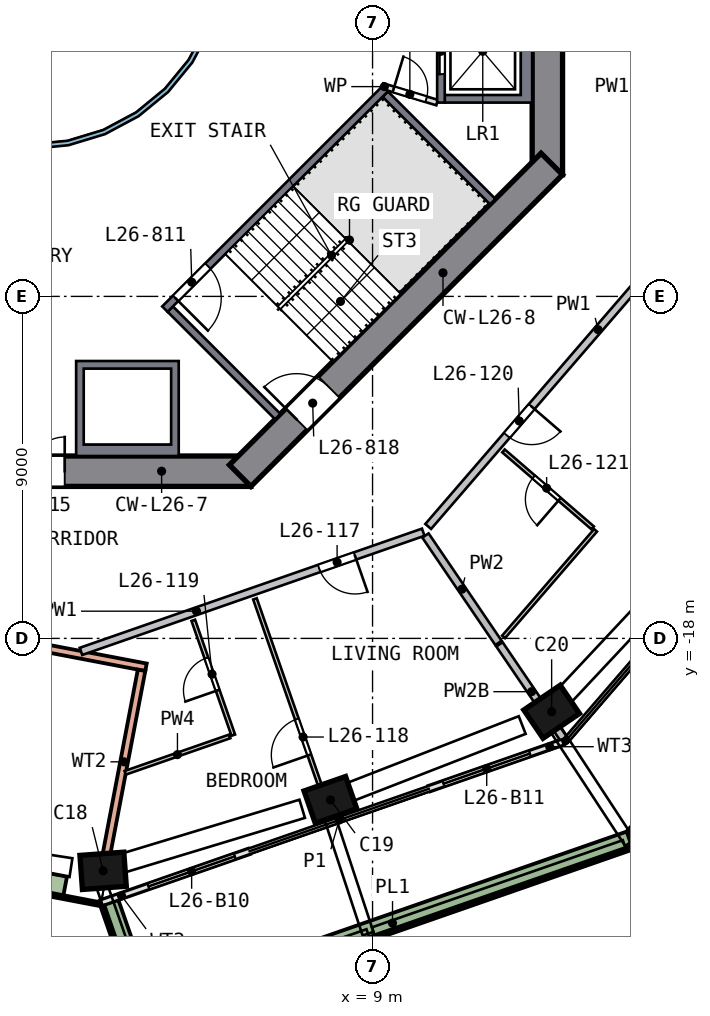
"""IFC4 building model, lengths in metres.
Left out: names, types, materials, properties, quantities, classifications, styles, units other than length and angle.
Written with IfcOpenShell. Run it as: python <this file> out.ifc"""

import sys

from ifc_helpers import new_model, si_unit, direction, frame, frame_2d, origin, origin_2d, place, context, subcontext, project, spatial, polyline, rectangle, outline, extrude, element, fill, save


model = new_model("IFC4")
c1 = context("Model", 3, precision=1e-05, world=origin(), true_north=direction((0.0, 1.0)))
c2 = subcontext(c1, "Body", "Model", "MODEL_VIEW")
j1 = project(units=[si_unit("LENGTHUNIT", "METRE"), si_unit("PLANEANGLEUNIT", "RADIAN")], contexts=[c1])
p1 = place(None, origin())
s1 = spatial("IfcSite", under=j1, at=p1, CompositionType="ELEMENT")
p2 = place(p1, origin())
s2 = spatial("IfcBuilding", under=s1, at=p2, CompositionType="ELEMENT")
p3 = place(p2, frame((0.0, 0.0, 111.5)))
s3 = spatial("IfcBuildingStorey", under=s2, at=p3, CompositionType="ELEMENT", Elevation=111.5)
p4 = place(p3, frame((1.772, -24.128, 0.0), z_axis=(0.114647953, 0.009351259, 0.99336217), x_axis=(-0.990724603, -0.072347102, 0.115024598)))
e1 = element("IfcColumn", 1, at=p4, inside=s3, PredefinedType="COLUMN", context=c2, shape_type="SweptSolid", body=[
    extrude(rectangle(XDim=1.15, YDim=0.9, at=origin_2d()), origin(), (0.0, 0.0, 1.0), 3.211),
])
p5 = place(p3, frame((7.764, -22.295, 0.0), z_axis=(0.105785359, 0.037872832, 0.993667503), x_axis=(0.938328119, 0.326980648, -0.112356557)))
e2 = element("IfcColumn", 2, at=p5, inside=s3, PredefinedType="COLUMN", context=c2, shape_type="SweptSolid", body=[
    extrude(rectangle(XDim=1.15, YDim=0.9, at=origin_2d()), origin(), (0.0, 0.0, 1.0), 3.21),
])
p6 = place(p3, frame((13.598, -20.009, 0.0), z_axis=(0.09457705, 0.065458875, 0.993363135), x_axis=(-0.821576739, -0.558375251, 0.115016268)))
e3 = element("IfcColumn", 3, at=p6, inside=s3, PredefinedType="COLUMN", context=c2, shape_type="SweptSolid", body=[
    extrude(rectangle(XDim=1.15, YDim=0.9, at=origin_2d()), origin(), (0.0, 0.0, 1.0), 3.211),
])
p7 = place(p3, frame((13.6, -5.799, 0.0), z_axis=(0.0, 0.0, 1.0), x_axis=(0.0, 1.0, 0.0)))
e4 = element("IfcWall", 4, at=p7, inside=s3, PredefinedType="SHEAR", context=c2, shape_type="SweptSolid", body=[
    extrude(rectangle(XDim=11.598, YDim=0.8, at=frame_2d((5.799, 0.0))), origin(), (0.0, 0.0, 1.0), 3.5),
])
p8 = place(p7, frame((4.899, 0.0, 0.0)))
e5 = element("IfcOpeningElement", 5, at=p8, cuts=e4, PredefinedType="OPENING", context=c2, shape_type="SweptSolid", body=[
    extrude(rectangle(XDim=1.8, YDim=2.1, at=frame_2d((0.9, 1.05))), frame((0.0, 0.41, 0.0), z_axis=(0.0, -1.0, 0.0), x_axis=(1.0, 0.0, 0.0)), (0.0, 0.0, 1.0), 0.82),
])
p9 = place(p3, frame((-5.799, -13.6, 0.0), z_axis=(0.0, 0.0, 1.0), x_axis=(1.0, 0.0, 0.0)))
e6 = element("IfcWall", 6, at=p9, inside=s3, PredefinedType="SHEAR", context=c2, shape_type="SweptSolid", body=[
    extrude(rectangle(XDim=11.598, YDim=0.8, at=frame_2d((5.799, 0.0))), origin(), (0.0, 0.0, 1.0), 3.5),
])
p10 = place(p9, frame((4.899, 0.0, 0.0)))
e7 = element("IfcOpeningElement", 7, at=p10, cuts=e6, PredefinedType="OPENING", context=c2, shape_type="SweptSolid", body=[
    extrude(rectangle(XDim=1.8, YDim=2.1, at=frame_2d((0.9, 1.05))), frame((0.0, 0.41, 0.0), z_axis=(0.0, -1.0, 0.0), x_axis=(1.0, 0.0, 0.0)), (0.0, 0.0, 1.0), 0.82),
])
p11 = place(p3, frame((5.516, -13.717, 0.0), z_axis=(0.0, 0.0, 1.0), x_axis=(0.707106781, 0.707106781, 0.0)))
e8 = element("IfcWall", 8, at=p11, inside=s3, PredefinedType="SHEAR", context=c2, shape_type="SweptSolid", body=[
    extrude(rectangle(XDim=11.598, YDim=0.8, at=frame_2d((5.799, 0.0))), origin(), (0.0, 0.0, 1.0), 3.5),
])
p12 = place(p11, frame((2.099, 0.0, 0.0)))
e9 = element("IfcOpeningElement", 9, at=p12, cuts=e8, PredefinedType="OPENING", context=c2, shape_type="SweptSolid", body=[
    extrude(rectangle(XDim=1.2, YDim=2.1, at=frame_2d((0.6, 1.05))), frame((0.0, 0.41, 0.0), z_axis=(0.0, -1.0, 0.0), x_axis=(1.0, 0.0, 0.0)), (0.0, 0.0, 1.0), 0.82),
])
p13 = place(p3, frame((1.871, -24.956, 0.0), z_axis=(0.0, 0.0, 1.0), x_axis=(0.944366835, 0.328894026, 0.0)))
e10 = element("IfcWall", 10, at=p13, inside=s3, PredefinedType="SOLIDWALL", context=c2, shape_type="SweptSolid", body=[
    extrude(rectangle(XDim=4.108, YDim=0.15, at=frame_2d((2.054, 0.0))), origin(), (0.0, 0.0, 1.0), 2.425),
])
p14 = place(p13, frame((1.308, 0.0, 0.0)))
e11 = element("IfcOpeningElement", 11, at=p14, cuts=e10, PredefinedType="OPENING", context=c2, shape_type="SweptSolid", body=[
    extrude(rectangle(XDim=2.4, YDim=2.4, at=frame_2d((1.2, 1.2))), frame((0.0, 0.085, 0.0), z_axis=(0.0, -1.0, 0.0), x_axis=(1.0, 0.0, 0.0)), (0.0, 0.0, 1.0), 0.17),
])
p15 = place(p3, frame((10.493, -21.954, 0.0), z_axis=(0.0, 0.0, 1.0), x_axis=(0.944367111, 0.328893235, 0.0)))
e12 = element("IfcWall", 12, at=p15, inside=s3, PredefinedType="SOLIDWALL", context=c2, shape_type="SweptSolid", body=[
    extrude(rectangle(XDim=3.71, YDim=0.15, at=frame_2d((1.855, 0.0))), origin(), (0.0, 0.0, 1.0), 2.425),
])
p16 = place(p15, frame((0.4, 0.0, 0.0)))
e13 = element("IfcOpeningElement", 13, at=p16, cuts=e12, PredefinedType="OPENING", context=c2, shape_type="SweptSolid", body=[
    extrude(rectangle(XDim=2.4, YDim=2.4, at=frame_2d((1.2, 1.2))), frame((0.0, 0.085, 0.0), z_axis=(0.0, -1.0, 0.0), x_axis=(1.0, 0.0, 0.0)), (0.0, 0.0, 1.0), 0.17),
])
p17 = place(p3, frame((2.076, -24.965, 0.0), z_axis=(0.0, 0.0, 1.0), x_axis=(0.328861017, -0.944378331, 0.0)))
e14 = element("IfcWall", 14, at=p17, inside=s3, PredefinedType="SOLIDWALL", context=c2, shape_type="SweptSolid", body=[
    extrude(rectangle(XDim=3.199, YDim=0.5, at=frame_2d((1.6, 0.0))), origin(), (0.0, 0.0, 1.0), 0.7),
])
p18 = place(p3, frame((3.282, -27.668, 0.0), z_axis=(0.0, 0.0, 1.0), x_axis=(0.94437244, 0.328877933, 0.0)))
e15 = element("IfcWall", 15, at=p18, inside=s3, PredefinedType="SOLIDWALL", context=c2, shape_type="SweptSolid", body=[
    extrude(rectangle(XDim=13.223, YDim=0.5, at=frame_2d((6.612, 0.0))), origin(), (0.0, 0.0, 1.0), 0.7),
])
p19 = place(p3, frame((15.877, -23.247, 0.0), z_axis=(0.0, 0.0, 1.0), x_axis=(0.653411418, 0.757002985, 0.0)))
e16 = element("IfcWall", 16, at=p19, inside=s3, PredefinedType="SOLIDWALL", context=c2, shape_type="SweptSolid", body=[
    extrude(rectangle(XDim=13.723, YDim=0.5, at=frame_2d((6.862, 0.0))), origin(), (0.0, 0.0, 1.0), 0.7),
])
p20 = place(p3, frame((3.039, -18.76, 0.0), z_axis=(0.0, 0.0, 1.0), x_axis=(-0.982286256, 0.187386526, 0.0)))
e17 = element("IfcWall", 17, at=p20, inside=s3, PredefinedType="SOLIDWALL", context=c2, shape_type="SweptSolid", body=[
    extrude(rectangle(XDim=13.0, YDim=0.2, at=frame_2d((6.5, 0.0))), origin(), (0.0, 0.0, 1.0), 3.19),
])
p21 = place(p20, frame((5.6, 0.0, 0.0)))
e18 = element("IfcOpeningElement", 18, at=p21, cuts=e17, PredefinedType="OPENING", context=c2, shape_type="SweptSolid", body=[
    extrude(rectangle(XDim=1.8, YDim=2.4, at=frame_2d((0.9, 1.2))), frame((0.0, 0.11, 0.0), z_axis=(0.0, -1.0, 0.0), x_axis=(1.0, 0.0, 0.0)), (0.0, 0.0, 1.0), 0.22),
])
p22 = place(p3, frame((2.003, -23.656, 0.0), z_axis=(0.0, 0.0, 1.0), x_axis=(0.187395784, 0.98228449, 0.0)))
e19 = element("IfcWall", 19, at=p22, inside=s3, PredefinedType="SOLIDWALL", context=c2, shape_type="SweptSolid", body=[
    extrude(rectangle(XDim=4.904, YDim=0.2, at=frame_2d((2.452, 0.0))), origin(), (0.0, 0.0, 1.0), 3.19),
])
p23 = place(p3, frame((-10.843, -22.577, 0.0), z_axis=(0.0, 0.0, 1.0), x_axis=(0.98229027, -0.187365485, 0.0)))
e20 = element("IfcWall", 20, at=p23, inside=s3, PredefinedType="SOLIDWALL", context=c2, shape_type="SweptSolid", body=[
    extrude(rectangle(XDim=12.84, YDim=0.1, at=frame_2d((6.42, 0.0))), origin(), (0.0, 0.0, 1.0), 0.7),
])
p24 = place(p3, frame((-3.463, -23.679, 0.0), z_axis=(0.0, 0.0, 1.0), x_axis=(0.982293441, -0.187348863, 0.0)))
e21 = element("IfcWall", 21, at=p24, inside=s3, PredefinedType="SOLIDWALL", context=c2, shape_type="SweptSolid", body=[
    extrude(rectangle(XDim=4.454, YDim=0.5, at=frame_2d((2.227, 0.0))), origin(), (0.0, 0.0, 1.0), 0.7),
])
p25 = place(p3, origin())
e22 = element("IfcWall", 22, at=p25, inside=s3, PredefinedType="SOLIDWALL", context=c2, shape_type="SweptSolid", body=[
    extrude(outline(polyline([(13.2, -3.9), (10.9, -3.9), (10.9, -3.7), (12.9, -3.7), (12.9, -1.4), (10.9, -1.4), (10.9, -1.2), (13.2, -1.2), (13.2, -3.9)])), origin(), (0.0, 0.0, 1.0), 3.19),
])
p26 = place(p3, frame((10.8, -1.2, 0.0), z_axis=(0.0, 0.0, 1.0), x_axis=(0.0, -1.0, 0.0)))
e23 = element("IfcWall", 23, at=p26, inside=s3, PredefinedType="SOLIDWALL", context=c2, shape_type="SweptSolid", body=[
    extrude(rectangle(XDim=2.7, YDim=0.2, at=frame_2d((1.35, 0.0))), origin(), (0.0, 0.0, 1.0), 3.19),
])
p27 = place(p26, frame((0.75, 0.0, 0.0)))
e24 = element("IfcOpeningElement", 24, at=p27, cuts=e23, PredefinedType="OPENING", context=c2, shape_type="SweptSolid", body=[
    extrude(rectangle(XDim=1.2, YDim=2.1, at=frame_2d((0.6, 1.05))), frame((0.0, 0.11, 0.0), z_axis=(0.0, -1.0, 0.0), x_axis=(1.0, 0.0, 0.0)), (0.0, 0.0, 1.0), 0.22),
])
p28 = place(p3, origin())
e25 = element("IfcWall", 25, at=p28, inside=s3, PredefinedType="SOLIDWALL", context=c2, shape_type="SweptSolid", body=[
    extrude(outline(polyline([(3.9, -10.7), (3.9, -13.2), (1.2, -13.2), (1.2, -10.7), (3.9, -10.7)]), holes=[polyline([(1.4, -12.9), (3.7, -12.9), (3.7, -10.9), (1.4, -10.9), (1.4, -12.9)])]), origin(), (0.0, 0.0, 1.0), 3.19),
])
p29 = place(p3, frame((9.334, -3.535, 0.0), z_axis=(0.0, 0.0, 1.0), x_axis=(-0.707106781, -0.707106781, 0.0)))
e26 = element("IfcWall", 26, at=p29, inside=s3, PredefinedType="SOLIDWALL", context=c2, shape_type="SweptSolid", body=[
    extrude(rectangle(XDim=8.2, YDim=0.2, at=frame_2d((4.1, 0.0))), origin(), (0.0, 0.0, 1.0), 3.19),
])
p30 = place(p29, frame((6.6, 0.0, 0.0)))
e27 = element("IfcOpeningElement", 27, at=p30, cuts=e26, PredefinedType="OPENING", context=c2, shape_type="SweptSolid", body=[
    extrude(rectangle(XDim=1.2, YDim=2.1, at=frame_2d((0.6, 1.05))), frame((0.0, 0.11, 0.0), z_axis=(0.0, -1.0, 0.0), x_axis=(1.0, 0.0, 0.0)), (0.0, 0.0, 1.0), 0.22),
])
for number, where, z_axis, x_axis in (
    (28, (3.677, -9.334, 0.0), (0.0, 0.0, 1.0), (0.707, -0.707, 0.0)),
    (29, (9.334, -3.677, 0.0), (0.0, 0.0, 1.0), (0.707, -0.707, 0.0)),
):
    element("IfcWall", number, at=place(p3, frame(where, z_axis=z_axis, x_axis=x_axis)), inside=s3, PredefinedType="SOLIDWALL", context=c2, shape_type="SweptSolid", body=[
        extrude(rectangle(XDim=4.0, YDim=0.2, at=frame_2d((2.0, 0.0))), origin(), (0.0, 0.0, 1.0), 3.19),
    ])
p31 = place(p3, frame((9.263, -3.465, 0.0), z_axis=(0.0, 0.0, 1.0), x_axis=(0.957084567, -0.289808785, 0.0)))
e30 = element("IfcWall", 30, at=p31, inside=s3, PredefinedType="PARTITIONING", context=c2, shape_type="SweptSolid", body=[
    extrude(rectangle(XDim=1.501, YDim=0.15, at=frame_2d((0.75, 0.0))), origin(), (0.0, 0.0, 1.0), 3.19),
])
p32 = place(p31, frame((0.301, 0.0, 0.0)))
e31 = element("IfcOpeningElement", 31, at=p32, cuts=e30, PredefinedType="OPENING", context=c2, shape_type="SweptSolid", body=[
    extrude(rectangle(XDim=0.9, YDim=2.1, at=frame_2d((0.45, 1.05))), frame((0.0, 0.085, 0.0), z_axis=(0.0, -1.0, 0.0), x_axis=(1.0, 0.0, 0.0)), (0.0, 0.0, 1.0), 0.17),
])
p33 = place(p3, origin())
e32 = element("IfcWall", 32, at=p33, inside=s3, PredefinedType="SOLIDWALL", context=c2, shape_type="SweptSolid", body=[
    extrude(outline(polyline([(5.021, -0.999), (4.73, -1.959), (4.257, -2.844), (3.62, -3.62), (2.844, -4.257), (1.959, -4.73), (0.999, -5.021), (0.0, -5.12), (-0.999, -5.021), (-1.959, -4.73), (-2.844, -4.257), (-3.62, -3.62), (-4.257, -2.844), (-4.73, -1.959), (-5.021, -0.999), (-5.12, 0.0), (-5.021, 0.999), (-4.73, 1.959), (-4.257, 2.844), (-3.62, 3.62), (-2.844, 4.257), (-1.959, 4.73), (-0.999, 5.021), (0.0, 5.12), (0.999, 5.021), (1.959, 4.73), (2.844, 4.257), (3.62, 3.62), (4.257, 2.844), (4.73, 1.959), (5.021, 0.999), (5.12, 0.0), (5.021, -0.999)]), holes=[polyline([(4.904, 0.976), (4.619, 1.913), (4.157, 2.778), (3.535, 3.535), (2.778, 4.157), (1.913, 4.619), (0.976, 4.904), (0.0, 5.0), (-0.976, 4.904), (-1.913, 4.619), (-2.778, 4.157), (-3.535, 3.535), (-4.157, 2.778), (-4.619, 1.913), (-4.904, 0.976), (-5.0, 0.0), (-4.904, -0.976), (-4.619, -1.913), (-4.157, -2.778), (-3.535, -3.535), (-2.778, -4.157), (-1.913, -4.619), (-0.976, -4.904), (0.0, -5.0), (0.976, -4.904), (1.913, -4.619), (2.778, -4.157), (3.535, -3.535), (4.157, -2.778), (4.619, -1.913), (4.904, -0.976), (5.0, 0.0), (4.904, 0.976)])]), origin(), (0.0, 0.0, 1.0), 3.19),
])
p34 = place(p3, frame((10.334, -15.206, 0.0), z_axis=(0.0, 0.0, 1.0), x_axis=(-0.944377236, -0.328864159, 0.0)))
e33 = element("IfcWall", 33, at=p34, inside=s3, PredefinedType="SOLIDWALL", context=c2, shape_type="SweptSolid", body=[
    extrude(rectangle(XDim=9.537, YDim=0.2, at=frame_2d((4.768, 0.0))), origin(), (0.0, 0.0, 1.0), 3.19),
])
p35 = place(p34, frame((1.9, 0.0, 0.0)))
e34 = element("IfcOpeningElement", 34, at=p35, cuts=e33, PredefinedType="OPENING", context=c2, shape_type="SweptSolid", body=[
    extrude(rectangle(XDim=1.0, YDim=2.1, at=frame_2d((0.5, 1.05))), frame((0.0, 0.11, 0.0), z_axis=(0.0, -1.0, 0.0), x_axis=(1.0, 0.0, 0.0)), (0.0, 0.0, 1.0), 0.22),
])
p36 = place(p3, frame((16.552, -8.002, 0.0), z_axis=(0.0, 0.0, 1.0), x_axis=(-0.653411751, -0.757002697, 0.0)))
e35 = element("IfcWall", 35, at=p36, inside=s3, PredefinedType="SOLIDWALL", context=c2, shape_type="SweptSolid", body=[
    extrude(rectangle(XDim=9.316, YDim=0.2, at=frame_2d((4.658, 0.0))), origin(), (0.0, 0.0, 1.0), 3.19),
])
p37 = place(p36, frame((5.15, 0.0, 0.0)))
e36 = element("IfcOpeningElement", 36, at=p37, cuts=e35, PredefinedType="OPENING", context=c2, shape_type="SweptSolid", body=[
    extrude(rectangle(XDim=1.0, YDim=2.1, at=frame_2d((0.5, 1.05))), frame((0.0, 0.11, 0.0), z_axis=(0.0, -1.0, 0.0), x_axis=(1.0, 0.0, 0.0)), (0.0, 0.0, 1.0), 0.22),
])
p38 = place(p3, frame((10.392, -15.291, 0.0), z_axis=(0.0, 0.0, 1.0), x_axis=(0.562061907, -0.827095165, 0.0)))
e37 = element("IfcWall", 37, at=p38, inside=s3, PredefinedType="SOLIDWALL", context=c2, shape_type="SweptSolid", body=[
    extrude(rectangle(XDim=3.418, YDim=0.2, at=frame_2d((1.709, 0.0))), origin(), (0.0, 0.0, 1.0), 3.19),
])
p39 = place(p3, frame((12.339, -18.156, 0.0), z_axis=(0.0, 0.0, 1.0), x_axis=(0.562123746, -0.827053138, 0.0)))
e38 = element("IfcWall", 38, at=p39, inside=s3, PredefinedType="SOLIDWALL", context=c2, shape_type="SweptSolid", body=[
    extrude(rectangle(XDim=3.011, YDim=0.2, at=frame_2d((1.506, 0.0))), origin(), (0.0, 0.0, 1.0), 2.69),
])
p40 = place(p3, frame((2.491, -21.537, 0.0), z_axis=(0.0, 0.0, 1.0), x_axis=(0.944364387, 0.328901056, 0.0)))
e39 = element("IfcWall", 39, at=p40, inside=s3, PredefinedType="PARTITIONING", context=c2, shape_type="SweptSolid", body=[
    extrude(rectangle(XDim=2.912, YDim=0.1, at=frame_2d((1.456, 0.0))), origin(), (0.0, 0.0, 1.0), 3.19),
])
p41 = place(p3, frame((5.335, -20.546, 0.0), z_axis=(0.0, 0.0, 1.0), x_axis=(-0.328834281, 0.944387641, 0.0)))
e40 = element("IfcWall", 40, at=p41, inside=s3, PredefinedType="PARTITIONING", context=c2, shape_type="SweptSolid", body=[
    extrude(rectangle(XDim=3.2, YDim=0.1, at=frame_2d((1.6, 0.0))), origin(), (0.0, 0.0, 1.0), 3.19),
])
p42 = place(p41, frame((1.25, 0.0, 0.0)))
e41 = element("IfcOpeningElement", 41, at=p42, cuts=e40, PredefinedType="OPENING", context=c2, shape_type="SweptSolid", body=[
    extrude(rectangle(XDim=0.9, YDim=2.1, at=frame_2d((0.45, 1.05))), frame((0.0, 0.06, 0.0), z_axis=(0.0, -1.0, 0.0), x_axis=(1.0, 0.0, 0.0)), (0.0, 0.0, 1.0), 0.12),
])
p43 = place(p3, frame((7.928, -22.767, 0.0), z_axis=(0.0, 0.0, 1.0), x_axis=(-0.328859343, 0.944378914, 0.0)))
e42 = element("IfcWall", 42, at=p43, inside=s3, PredefinedType="PARTITIONING", context=c2, shape_type="SweptSolid", body=[
    extrude(rectangle(XDim=6.15, YDim=0.1, at=frame_2d((3.075, 0.0))), origin(), (0.0, 0.0, 1.0), 3.19),
])
p44 = place(p43, frame((1.8, 0.0, 0.0)))
e43 = element("IfcOpeningElement", 43, at=p44, cuts=e42, PredefinedType="OPENING", context=c2, shape_type="SweptSolid", body=[
    extrude(rectangle(XDim=1.0, YDim=2.1, at=frame_2d((0.5, 1.05))), frame((0.0, 0.06, 0.0), z_axis=(0.0, -1.0, 0.0), x_axis=(1.0, 0.0, 0.0)), (0.0, 0.0, 1.0), 0.12),
])
p45 = place(p3, frame((14.792, -15.091, 0.0), z_axis=(0.0, 0.0, 1.0), x_axis=(-0.75698944, 0.65342711, 0.0)))
e44 = element("IfcWall", 44, at=p45, inside=s3, PredefinedType="PARTITIONING", context=c2, shape_type="SweptSolid", body=[
    extrude(rectangle(XDim=3.1, YDim=0.1, at=frame_2d((1.55, 0.0))), origin(), (0.0, 0.0, 1.0), 3.19),
])
p46 = place(p45, frame((1.15, 0.0, 0.0)))
e45 = element("IfcOpeningElement", 45, at=p46, cuts=e44, PredefinedType="OPENING", context=c2, shape_type="SweptSolid", body=[
    extrude(rectangle(XDim=0.9, YDim=2.1, at=frame_2d((0.45, 1.05))), frame((0.0, 0.06, 0.0), z_axis=(0.0, -1.0, 0.0), x_axis=(1.0, 0.0, 0.0)), (0.0, 0.0, 1.0), 0.12),
])
p47 = place(p3, frame((14.868, -15.156, 0.0), z_axis=(0.0, 0.0, 1.0), x_axis=(-0.653436238, -0.756981561, 0.0)))
e46 = element("IfcWall", 46, at=p47, inside=s3, PredefinedType="PARTITIONING", context=c2, shape_type="SweptSolid", body=[
    extrude(rectangle(XDim=3.704, YDim=0.1, at=frame_2d((1.852, 0.0))), origin(), (0.0, 0.0, 1.0), 3.19),
])
p48 = place(p14, origin())
e47 = element("IfcDoor", 47, at=p48, inside=s3, OperationType="SLIDING_TO_LEFT", PredefinedType="DOOR", context=c2, shape_type="SweptSolid", body=[
    extrude(rectangle(XDim=2.4, YDim=2.4, at=frame_2d((1.2, 1.2))), frame((0.0, 0.025, 0.0), z_axis=(0.0, -1.0, 0.0), x_axis=(1.0, 0.0, 0.0)), (0.0, 0.0, 1.0), 0.05),
])
fill(e11, e47)
p49 = place(p16, origin())
e48 = element("IfcDoor", 48, at=p49, inside=s3, OperationType="SLIDING_TO_RIGHT", PredefinedType="DOOR", context=c2, shape_type="SweptSolid", body=[
    extrude(rectangle(XDim=2.4, YDim=2.4, at=frame_2d((1.2, 1.2))), frame((0.0, 0.025, 0.0), z_axis=(0.0, -1.0, 0.0), x_axis=(1.0, 0.0, 0.0)), (0.0, 0.0, 1.0), 0.05),
])
fill(e13, e48)
p50 = place(p27, origin())
e49 = element("IfcDoor", 49, at=p50, inside=s3, OperationType="DOUBLE_DOOR_SLIDING", PredefinedType="DOOR", context=c2, shape_type="SweptSolid", body=[
    extrude(rectangle(XDim=1.2, YDim=2.1, at=frame_2d((0.6, 1.05))), frame((0.0, 0.025, 0.0), z_axis=(0.0, -1.0, 0.0), x_axis=(1.0, 0.0, 0.0)), (0.0, 0.0, 1.0), 0.05),
])
fill(e24, e49)
p51 = place(p30, origin())
e50 = element("IfcDoor", 50, at=p51, inside=s3, OperationType="SINGLE_SWING_RIGHT", PredefinedType="DOOR", context=c2, shape_type="SweptSolid", body=[
    extrude(rectangle(XDim=1.2, YDim=2.1, at=frame_2d((0.6, 1.05))), frame((0.0, 0.025, 0.0), z_axis=(0.0, -1.0, 0.0), x_axis=(1.0, 0.0, 0.0)), (0.0, 0.0, 1.0), 0.05),
])
fill(e27, e50)
p52 = place(p10, origin())
e51 = element("IfcDoor", 51, at=p52, inside=s3, OperationType="DOUBLE_DOOR_SINGLE_SWING", PredefinedType="DOOR", context=c2, shape_type="SweptSolid", body=[
    extrude(rectangle(XDim=1.8, YDim=2.1, at=frame_2d((0.9, 1.05))), frame((0.0, 0.025, 0.0), z_axis=(0.0, -1.0, 0.0), x_axis=(1.0, 0.0, 0.0)), (0.0, 0.0, 1.0), 0.05),
])
fill(e7, e51)
p53 = place(p12, origin())
e52 = element("IfcDoor", 52, at=p53, inside=s3, OperationType="SINGLE_SWING_LEFT", PredefinedType="DOOR", context=c2, shape_type="SweptSolid", body=[
    extrude(rectangle(XDim=1.2, YDim=2.1, at=frame_2d((0.6, 1.05))), frame((0.0, 0.025, 0.0), z_axis=(0.0, -1.0, 0.0), x_axis=(1.0, 0.0, 0.0)), (0.0, 0.0, 1.0), 0.05),
])
fill(e9, e52)
p54 = place(p32, origin())
e53 = element("IfcDoor", 53, at=p54, inside=s3, OperationType="SINGLE_SWING_LEFT", PredefinedType="DOOR", context=c2, shape_type="SweptSolid", body=[
    extrude(rectangle(XDim=0.9, YDim=2.1, at=frame_2d((0.45, 1.05))), frame((0.0, 0.025, 0.0), z_axis=(0.0, -1.0, 0.0), x_axis=(1.0, 0.0, 0.0)), (0.0, 0.0, 1.0), 0.05),
])
fill(e31, e53)
p55 = place(p35, origin())
e54 = element("IfcDoor", 54, at=p55, inside=s3, OperationType="SINGLE_SWING_LEFT", PredefinedType="DOOR", context=c2, shape_type="SweptSolid", body=[
    extrude(rectangle(XDim=1.0, YDim=2.1, at=frame_2d((0.5, 1.05))), frame((0.0, 0.025, 0.0), z_axis=(0.0, -1.0, 0.0), x_axis=(1.0, 0.0, 0.0)), (0.0, 0.0, 1.0), 0.05),
])
fill(e34, e54)
p56 = place(p44, origin())
e55 = element("IfcDoor", 55, at=p56, inside=s3, OperationType="SINGLE_SWING_LEFT", PredefinedType="DOOR", context=c2, shape_type="SweptSolid", body=[
    extrude(rectangle(XDim=1.0, YDim=2.1, at=frame_2d((0.5, 1.05))), frame((0.0, 0.025, 0.0), z_axis=(0.0, -1.0, 0.0), x_axis=(1.0, 0.0, 0.0)), (0.0, 0.0, 1.0), 0.05),
])
fill(e43, e55)
p57 = place(p42, origin())
e56 = element("IfcDoor", 56, at=p57, inside=s3, OperationType="SINGLE_SWING_LEFT", PredefinedType="DOOR", context=c2, shape_type="SweptSolid", body=[
    extrude(rectangle(XDim=0.9, YDim=2.1, at=frame_2d((0.45, 1.05))), frame((0.0, 0.025, 0.0), z_axis=(0.0, -1.0, 0.0), x_axis=(1.0, 0.0, 0.0)), (0.0, 0.0, 1.0), 0.05),
])
fill(e41, e56)
p58 = place(p37, origin())
e57 = element("IfcDoor", 57, at=p58, inside=s3, OperationType="SINGLE_SWING_LEFT", PredefinedType="DOOR", context=c2, shape_type="SweptSolid", body=[
    extrude(rectangle(XDim=1.0, YDim=2.1, at=frame_2d((0.5, 1.05))), frame((0.0, 0.025, 0.0), z_axis=(0.0, -1.0, 0.0), x_axis=(1.0, 0.0, 0.0)), (0.0, 0.0, 1.0), 0.05),
])
fill(e36, e57)
p59 = place(p46, origin())
e58 = element("IfcDoor", 58, at=p59, inside=s3, OperationType="SINGLE_SWING_LEFT", PredefinedType="DOOR", context=c2, shape_type="SweptSolid", body=[
    extrude(rectangle(XDim=0.9, YDim=2.1, at=frame_2d((0.45, 1.05))), frame((0.0, 0.025, 0.0), z_axis=(0.0, -1.0, 0.0), x_axis=(1.0, 0.0, 0.0)), (0.0, 0.0, 1.0), 0.05),
])
fill(e45, e58)
save(model, sys.argv[1])
